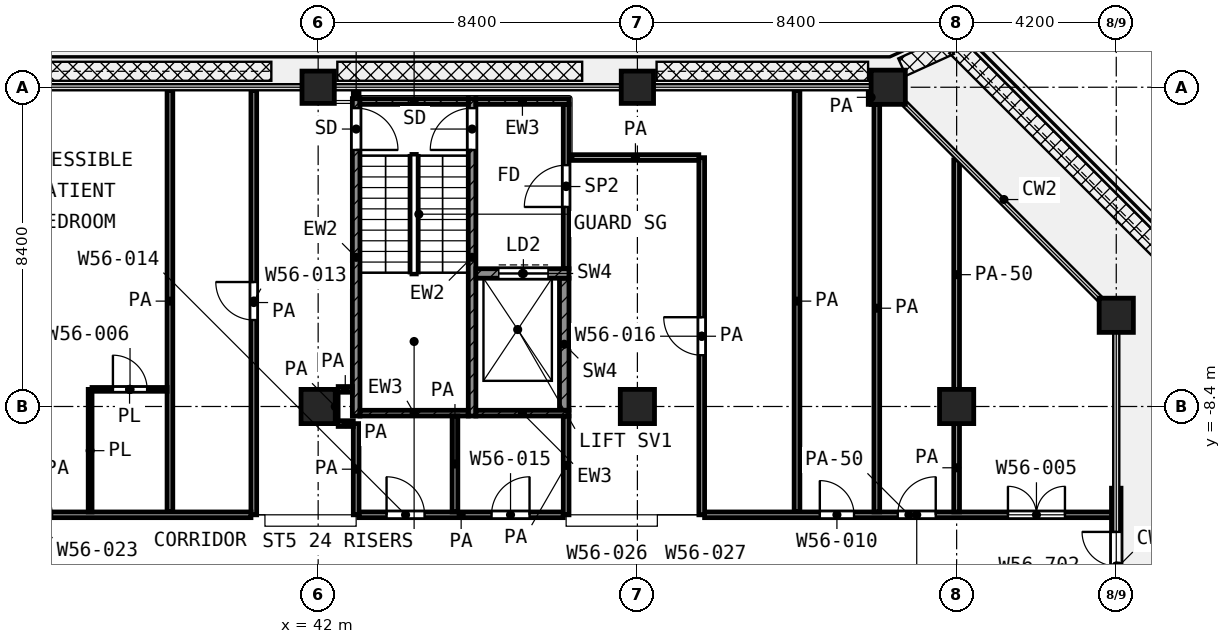
"""IFC4 building model, lengths in metres.
Left out: names, types, materials, properties, quantities, classifications, styles, units other than length and angle.
Written with IfcOpenShell. Run it as: python <this file> out.ifc"""

import sys

from ifc_helpers import new_model, si_unit, direction, frame, frame_2d, origin, origin_2d, place, context, subcontext, project, spatial, rectangle, extrude, element, fill, save


model = new_model("IFC4")
c1 = context("Model", 3, precision=1e-05, world=origin(), true_north=direction((0.0, 1.0)))
c2 = subcontext(c1, "Body", "Model", "MODEL_VIEW")
j1 = project(units=[si_unit("LENGTHUNIT", "METRE"), si_unit("PLANEANGLEUNIT", "RADIAN")], contexts=[c1])
p1 = place(None, origin())
s1 = spatial("IfcSite", under=j1, at=p1, CompositionType="ELEMENT")
p2 = place(p1, origin())
s2 = spatial("IfcBuilding", under=s1, at=p2, CompositionType="ELEMENT")
p3 = place(p2, frame((0.0, 0.0, 264.2)))
s3 = spatial("IfcBuildingStorey", under=s2, at=p3, CompositionType="ELEMENT", Elevation=264.2)
for number, where, z_axis, x_axis in (
    (1, (42.0, 0.0, 0.0), (0.0, 0.0, 1.0), (1.0, 0.0, 0.0)),
    (2, (50.4, 0.0, 0.0), (0.0, 0.0, 1.0), (1.0, 0.0, 0.0)),
):
    element("IfcColumn", number, at=place(p3, frame(where, z_axis=z_axis, x_axis=x_axis)), inside=s3, PredefinedType="COLUMN", context=c2, shape_type="SweptSolid", body=[
        extrude(rectangle(XDim=0.85, YDim=0.85, at=origin_2d()), origin(), (0.0, 0.0, 1.0), 4.2),
    ])
for number, where, z_axis, x_axis in (
    (3, (57.0, 0.0, 0.0), (0.0, 0.0, 1.0), (1.0, 0.0, 0.0)),
    (4, (63.0, -6.0, 0.0), (0.0, 0.0, 1.0), (1.0, 0.0, 0.0)),
    (5, (42.0, -8.4, 0.0), (0.0, 0.0, 1.0), (1.0, 0.0, 0.0)),
    (6, (50.4, -8.4, 0.0), (0.0, 0.0, 1.0), (1.0, 0.0, 0.0)),
    (7, (58.8, -8.4, 0.0), (0.0, 0.0, 1.0), (1.0, 0.0, 0.0)),
):
    element("IfcColumn", number, at=place(p3, frame(where, z_axis=z_axis, x_axis=x_axis)), inside=s3, PredefinedType="COLUMN", context=c2, shape_type="SweptSolid", body=[
        extrude(rectangle(XDim=0.9, YDim=0.9, at=origin_2d()), origin(), (0.0, 0.0, 1.0), 4.2),
    ])
p4 = place(p3, frame((63.0, -14.65, 0.0), z_axis=(0.0, 0.0, 1.0), x_axis=(0.0, 1.0, 0.0)))
e8 = element("IfcWall", 8, at=p4, inside=s3, PredefinedType="SOLIDWALL", context=c2, shape_type="SweptSolid", body=[
    extrude(rectangle(XDim=4.1, YDim=0.25, at=frame_2d((2.05, 0.0))), origin(), (0.0, 0.0, 1.0), 2.58),
])
p5 = place(p4, frame((1.15, 0.0, 0.0)))
e9 = element("IfcOpeningElement", 9, at=p5, cuts=e8, PredefinedType="OPENING", context=c2, shape_type="SweptSolid", body=[
    extrude(rectangle(XDim=1.8, YDim=2.1, at=frame_2d((0.9, 1.05))), frame((0.0, 0.135, 0.0), z_axis=(0.0, -1.0, 0.0), x_axis=(1.0, 0.0, 0.0)), (0.0, 0.0, 1.0), 0.27),
])
p6 = place(p3, frame((43.0, -8.65, 0.0), z_axis=(0.0, 0.0, 1.0), x_axis=(0.0, 1.0, 0.0)))
e10 = element("IfcWall", 10, at=p6, inside=s3, PredefinedType="SHEAR", context=c2, shape_type="SweptSolid", body=[
    extrude(rectangle(XDim=8.35, YDim=0.2, at=frame_2d((4.175, 0.0))), origin(), (0.0, 0.0, 1.0), 3.6),
])
p7 = place(p6, frame((7.0, 0.0, 0.0)))
e11 = element("IfcOpeningElement", 11, at=p7, cuts=e10, PredefinedType="OPENING", context=c2, shape_type="SweptSolid", body=[
    extrude(rectangle(XDim=1.1, YDim=2.1, at=frame_2d((0.55, 1.05))), frame((0.0, 0.11, 0.0), z_axis=(0.0, -1.0, 0.0), x_axis=(1.0, 0.0, 0.0)), (0.0, 0.0, 1.0), 0.22),
])
p8 = place(p3, frame((46.05, -8.65, 0.0), z_axis=(0.0, 0.0, 1.0), x_axis=(0.0, 1.0, 0.0)))
e12 = element("IfcWall", 12, at=p8, inside=s3, PredefinedType="SHEAR", context=c2, shape_type="SweptSolid", body=[
    extrude(rectangle(XDim=8.35, YDim=0.2, at=frame_2d((4.175, 0.0))), origin(), (0.0, 0.0, 1.0), 3.6),
])
p9 = place(p8, frame((7.0, 0.0, 0.0)))
e13 = element("IfcOpeningElement", 13, at=p9, cuts=e12, PredefinedType="OPENING", context=c2, shape_type="SweptSolid", body=[
    extrude(rectangle(XDim=1.1, YDim=2.1, at=frame_2d((0.55, 1.05))), frame((0.0, 0.11, 0.0), z_axis=(0.0, -1.0, 0.0), x_axis=(1.0, 0.0, 0.0)), (0.0, 0.0, 1.0), 0.22),
])
p10 = place(p3, frame((43.1, -0.375, 0.0), z_axis=(0.0, 0.0, 1.0), x_axis=(1.0, 0.0, 0.0)))
e14 = element("IfcWall", 14, at=p10, inside=s3, PredefinedType="SHEAR", context=c2, shape_type="SweptSolid", body=[
    extrude(rectangle(XDim=2.85, YDim=0.15, at=frame_2d((1.425, 0.0))), origin(), (0.0, 0.0, 1.0), 3.6),
])
p11 = place(p3, frame((46.15, -0.375, 0.0), z_axis=(0.0, 0.0, 1.0), x_axis=(1.0, 0.0, 0.0)))
e15 = element("IfcWall", 15, at=p11, inside=s3, PredefinedType="SHEAR", context=c2, shape_type="SweptSolid", body=[
    extrude(rectangle(XDim=2.45, YDim=0.15, at=frame_2d((1.225, 0.0))), origin(), (0.0, 0.0, 1.0), 3.6),
])
p12 = place(p3, frame((43.1, -8.575, 0.0), z_axis=(0.0, 0.0, 1.0), x_axis=(1.0, 0.0, 0.0)))
e16 = element("IfcWall", 16, at=p12, inside=s3, PredefinedType="SHEAR", context=c2, shape_type="SweptSolid", body=[
    extrude(rectangle(XDim=2.85, YDim=0.15, at=frame_2d((1.425, 0.0))), origin(), (0.0, 0.0, 1.0), 3.6),
])
p13 = place(p3, frame((46.15, -8.575, 0.0), z_axis=(0.0, 0.0, 1.0), x_axis=(1.0, 0.0, 0.0)))
e17 = element("IfcWall", 17, at=p13, inside=s3, PredefinedType="SHEAR", context=c2, shape_type="SweptSolid", body=[
    extrude(rectangle(XDim=2.45, YDim=0.15, at=frame_2d((1.225, 0.0))), origin(), (0.0, 0.0, 1.0), 3.6),
])
p14 = place(p3, frame((46.15, -4.9, 0.0), z_axis=(0.0, 0.0, 1.0), x_axis=(1.0, 0.0, 0.0)))
e18 = element("IfcWall", 18, at=p14, inside=s3, PredefinedType="SHEAR", context=c2, shape_type="SweptSolid", body=[
    extrude(rectangle(XDim=2.45, YDim=0.25, at=frame_2d((1.225, 0.0))), origin(), (0.0, 0.0, 1.0), 3.6),
])
p15 = place(p14, frame((0.6, 0.0, 0.0)))
e19 = element("IfcOpeningElement", 19, at=p15, cuts=e18, PredefinedType="OPENING", context=c2, shape_type="SweptSolid", body=[
    extrude(rectangle(XDim=1.3, YDim=2.1, at=frame_2d((0.65, 1.05))), frame((0.0, 0.135, 0.0), z_axis=(0.0, -1.0, 0.0), x_axis=(1.0, 0.0, 0.0)), (0.0, 0.0, 1.0), 0.27),
])
p16 = place(p3, frame((48.475, -8.5, 0.0), z_axis=(0.0, 0.0, 1.0), x_axis=(0.0, 1.0, 0.0)))
e20 = element("IfcWall", 20, at=p16, inside=s3, PredefinedType="SHEAR", context=c2, shape_type="SweptSolid", body=[
    extrude(rectangle(XDim=3.475, YDim=0.25, at=frame_2d((1.738, 0.0))), origin(), (0.0, 0.0, 1.0), 3.6),
])
p17 = place(p3, frame((48.525, -4.775, 0.0), z_axis=(0.0, 0.0, 1.0), x_axis=(0.0, 1.0, 0.0)))
e21 = element("IfcWall", 21, at=p17, inside=s3, PredefinedType="PARTITIONING", context=c2, shape_type="SweptSolid", body=[
    extrude(rectangle(XDim=4.325, YDim=0.15, at=frame_2d((2.163, 0.0))), origin(), (0.0, 0.0, 1.0), 3.6),
])
p18 = place(p17, frame((1.625, 0.0, 0.0)))
e22 = element("IfcOpeningElement", 22, at=p18, cuts=e21, PredefinedType="OPENING", context=c2, shape_type="SweptSolid", body=[
    extrude(rectangle(XDim=1.1, YDim=2.1, at=frame_2d((0.55, 1.05))), frame((0.0, 0.085, 0.0), z_axis=(0.0, -1.0, 0.0), x_axis=(1.0, 0.0, 0.0)), (0.0, 0.0, 1.0), 0.17),
])
p19 = place(p3, frame((36.05, -7.95, 0.0), z_axis=(0.0, 0.0, 1.0), x_axis=(1.0, 0.0, 0.0)))
e23 = element("IfcWall", 23, at=p19, inside=s3, PredefinedType="PARTITIONING", context=c2, shape_type="SweptSolid", body=[
    extrude(rectangle(XDim=1.975, YDim=0.1, at=frame_2d((0.987, 0.0))), origin(), (0.0, 0.0, 1.0), 3.6),
])
p20 = place(p19, frame((0.55, 0.0, 0.0)))
e24 = element("IfcOpeningElement", 24, at=p20, cuts=e23, PredefinedType="OPENING", context=c2, shape_type="SweptSolid", body=[
    extrude(rectangle(XDim=0.9, YDim=2.1, at=frame_2d((0.45, 1.05))), frame((0.0, 0.06, 0.0), z_axis=(0.0, -1.0, 0.0), x_axis=(1.0, 0.0, 0.0)), (0.0, 0.0, 1.0), 0.12),
])
p21 = place(p3, frame((36.0, -11.175, 0.0), z_axis=(0.0, 0.0, 1.0), x_axis=(0.0, 1.0, 0.0)))
e25 = element("IfcWall", 25, at=p21, inside=s3, PredefinedType="PARTITIONING", context=c2, shape_type="SweptSolid", body=[
    extrude(rectangle(XDim=3.225, YDim=0.1, at=frame_2d((1.613, 0.0))), origin(), (0.0, 0.0, 1.0), 3.6),
])
p22 = place(p3, frame((29.4, -11.25, 0.0), z_axis=(0.0, 0.0, 1.0), x_axis=(1.0, 0.0, 0.0)))
e26 = element("IfcWall", 26, at=p22, inside=s3, PredefinedType="PARTITIONING", context=c2, shape_type="SweptSolid", body=[
    extrude(rectangle(XDim=10.832, YDim=0.15, at=frame_2d((5.416, 0.0))), origin(), (0.0, 0.0, 1.0), 3.6),
])
p23 = place(p22, frame((1.5, 0.0, 0.0)))
e27 = element("IfcOpeningElement", 27, at=p23, cuts=e26, PredefinedType="OPENING", context=c2, shape_type="SweptSolid", body=[
    extrude(rectangle(XDim=1.2, YDim=2.1, at=frame_2d((0.6, 1.05))), frame((0.0, 0.085, 0.0), z_axis=(0.0, -1.0, 0.0), x_axis=(1.0, 0.0, 0.0)), (0.0, 0.0, 1.0), 0.17),
])
p24 = place(p22, frame((4.4, 0.0, 0.0)))
e28 = element("IfcOpeningElement", 28, at=p24, cuts=e26, PredefinedType="OPENING", context=c2, shape_type="SweptSolid", body=[
    extrude(rectangle(XDim=1.2, YDim=2.1, at=frame_2d((0.6, 1.05))), frame((0.0, 0.085, 0.0), z_axis=(0.0, -1.0, 0.0), x_axis=(1.0, 0.0, 0.0)), (0.0, 0.0, 1.0), 0.17),
])
p25 = place(p3, frame((43.075, -11.25, 0.0), z_axis=(0.0, 0.0, 1.0), x_axis=(1.0, 0.0, 0.0)))
e29 = element("IfcWall", 29, at=p25, inside=s3, PredefinedType="PARTITIONING", context=c2, shape_type="SweptSolid", body=[
    extrude(rectangle(XDim=5.375, YDim=0.15, at=frame_2d((2.688, 0.0))), origin(), (0.0, 0.0, 1.0), 3.6),
])
p26 = place(p25, frame((0.725, 0.0, 0.0)))
e30 = element("IfcOpeningElement", 30, at=p26, cuts=e29, PredefinedType="OPENING", context=c2, shape_type="SweptSolid", body=[
    extrude(rectangle(XDim=1.0, YDim=2.1, at=frame_2d((0.5, 1.05))), frame((0.0, 0.085, 0.0), z_axis=(0.0, -1.0, 0.0), x_axis=(1.0, 0.0, 0.0)), (0.0, 0.0, 1.0), 0.17),
])
p27 = place(p25, frame((3.487, 0.0, 0.0)))
e31 = element("IfcOpeningElement", 31, at=p27, cuts=e29, PredefinedType="OPENING", context=c2, shape_type="SweptSolid", body=[
    extrude(rectangle(XDim=1.0, YDim=2.1, at=frame_2d((0.5, 1.05))), frame((0.0, 0.085, 0.0), z_axis=(0.0, -1.0, 0.0), x_axis=(1.0, 0.0, 0.0)), (0.0, 0.0, 1.0), 0.17),
])
p28 = place(p3, frame((52.168, -11.25, 0.0), z_axis=(0.0, 0.0, 1.0), x_axis=(1.0, 0.0, 0.0)))
e32 = element("IfcWall", 32, at=p28, inside=s3, PredefinedType="PARTITIONING", context=c2, shape_type="SweptSolid", body=[
    extrude(rectangle(XDim=10.752, YDim=0.15, at=frame_2d((5.376, 0.0))), origin(), (0.0, 0.0, 1.0), 2.7),
])
p29 = place(p28, frame((3.032, 0.0, 0.0)))
e33 = element("IfcOpeningElement", 33, at=p29, cuts=e32, PredefinedType="OPENING", context=c2, shape_type="SweptSolid", body=[
    extrude(rectangle(XDim=0.9, YDim=2.1, at=frame_2d((0.45, 1.05))), frame((0.0, 0.085, 0.0), z_axis=(0.0, -1.0, 0.0), x_axis=(1.0, 0.0, 0.0)), (0.0, 0.0, 1.0), 0.17),
])
p30 = place(p28, frame((5.082, 0.0, 0.0)))
e34 = element("IfcOpeningElement", 34, at=p30, cuts=e32, PredefinedType="OPENING", context=c2, shape_type="SweptSolid", body=[
    extrude(rectangle(XDim=1.0, YDim=2.1, at=frame_2d((0.5, 1.05))), frame((0.0, 0.085, 0.0), z_axis=(0.0, -1.0, 0.0), x_axis=(1.0, 0.0, 0.0)), (0.0, 0.0, 1.0), 0.17),
])
p31 = place(p28, frame((7.982, 0.0, 0.0)))
e35 = element("IfcOpeningElement", 35, at=p31, cuts=e32, PredefinedType="OPENING", context=c2, shape_type="SweptSolid", body=[
    extrude(rectangle(XDim=1.5, YDim=2.1, at=frame_2d((0.75, 1.05))), frame((0.0, 0.085, 0.0), z_axis=(0.0, -1.0, 0.0), x_axis=(1.0, 0.0, 0.0)), (0.0, 0.0, 1.0), 0.17),
])
p32 = place(p3, frame((42.527, -8.85, 0.0), z_axis=(0.0, 0.0, 1.0), x_axis=(1.0, 0.0, 0.0)))
e36 = element("IfcWall", 36, at=p32, inside=s3, PredefinedType="PARTITIONING", context=c2, shape_type="SweptSolid", body=[
    extrude(rectangle(XDim=0.398, YDim=0.15, at=frame_2d((0.199, 0.0))), origin(), (0.0, 0.0, 1.0), 3.6),
])
p33 = place(p3, frame((42.527, -7.95, 0.0), z_axis=(0.0, 0.0, 1.0), x_axis=(1.0, 0.0, 0.0)))
e37 = element("IfcWall", 37, at=p33, inside=s3, PredefinedType="PARTITIONING", context=c2, shape_type="SweptSolid", body=[
    extrude(rectangle(XDim=0.373, YDim=0.15, at=frame_2d((0.187, 0.0))), origin(), (0.0, 0.0, 1.0), 3.6),
])
p34 = place(p3, frame((48.68, -1.85, 0.0), z_axis=(0.0, 0.0, 1.0), x_axis=(1.0, 0.0, 0.0)))
e38 = element("IfcWall", 38, at=p34, inside=s3, PredefinedType="PARTITIONING", context=c2, shape_type="SweptSolid", body=[
    extrude(rectangle(XDim=3.336, YDim=0.15, at=frame_2d((1.668, 0.0))), origin(), (0.0, 0.0, 1.0), 3.6),
])
p35 = place(p3, frame((38.1, -11.175, 0.0), z_axis=(0.0, 0.0, 1.0), x_axis=(0.0, 1.0, 0.0)))
e39 = element("IfcWall", 39, at=p35, inside=s3, PredefinedType="PARTITIONING", context=c2, shape_type="SweptSolid", body=[
    extrude(rectangle(XDim=11.095, YDim=0.15, at=frame_2d((5.547, 0.0))), origin(), (0.0, 0.0, 1.0), 3.6),
])
p36 = place(p3, frame((40.307, -11.25, 0.0), z_axis=(0.0, 0.0, 1.0), x_axis=(0.0, 1.0, 0.0)))
e40 = element("IfcWall", 40, at=p36, inside=s3, PredefinedType="PARTITIONING", context=c2, shape_type="SweptSolid", body=[
    extrude(rectangle(XDim=11.17, YDim=0.15, at=frame_2d((5.585, 0.0))), origin(), (0.0, 0.0, 1.0), 3.6),
])
p37 = place(p36, frame((5.125, 0.0, 0.0)))
e41 = element("IfcOpeningElement", 41, at=p37, cuts=e40, PredefinedType="OPENING", context=c2, shape_type="SweptSolid", body=[
    extrude(rectangle(XDim=1.0, YDim=2.1, at=frame_2d((0.5, 1.05))), frame((0.0, 0.085, 0.0), z_axis=(0.0, -1.0, 0.0), x_axis=(1.0, 0.0, 0.0)), (0.0, 0.0, 1.0), 0.17),
])
p38 = place(p3, frame((42.45, -8.849, 0.0), z_axis=(0.0, 0.0, 1.0), x_axis=(0.0, 1.0, 0.0)))
e42 = element("IfcWall", 42, at=p38, inside=s3, PredefinedType="PARTITIONING", context=c2, shape_type="SweptSolid", body=[
    extrude(rectangle(XDim=0.897, YDim=0.15, at=frame_2d((0.449, 0.0))), origin(), (0.0, 0.0, 1.0), 3.6),
])
p39 = place(p3, frame((43.0, -11.25, 0.0), z_axis=(0.0, 0.0, 1.0), x_axis=(0.0, 1.0, 0.0)))
e43 = element("IfcWall", 43, at=p39, inside=s3, PredefinedType="PARTITIONING", context=c2, shape_type="SweptSolid", body=[
    extrude(rectangle(XDim=2.4, YDim=0.15, at=frame_2d((1.2, 0.0))), origin(), (0.0, 0.0, 1.0), 3.6),
])
p40 = place(p3, frame((43.0, -0.27, 0.0), z_axis=(0.0, 0.0, 1.0), x_axis=(0.0, 1.0, 0.0)))
e44 = element("IfcWall", 44, at=p40, inside=s3, PredefinedType="PARTITIONING", context=c2, shape_type="SweptSolid", body=[
    extrude(rectangle(XDim=0.19, YDim=0.15, at=frame_2d((0.095, 0.0))), origin(), (0.0, 0.0, 1.0), 3.6),
])
p41 = place(p3, frame((45.6, -11.175, 0.0), z_axis=(0.0, 0.0, 1.0), x_axis=(0.0, 1.0, 0.0)))
e45 = element("IfcWall", 45, at=p41, inside=s3, PredefinedType="PARTITIONING", context=c2, shape_type="SweptSolid", body=[
    extrude(rectangle(XDim=2.525, YDim=0.15, at=frame_2d((1.263, 0.0))), origin(), (0.0, 0.0, 1.0), 3.6),
])
p42 = place(p3, frame((48.525, -11.25, 0.0), z_axis=(0.0, 0.0, 1.0), x_axis=(0.0, 1.0, 0.0)))
e46 = element("IfcWall", 46, at=p42, inside=s3, PredefinedType="PARTITIONING", context=c2, shape_type="SweptSolid", body=[
    extrude(rectangle(XDim=2.6, YDim=0.15, at=frame_2d((1.3, 0.0))), origin(), (0.0, 0.0, 1.0), 3.6),
])
p43 = place(p3, frame((52.093, -11.25, 0.0), z_axis=(0.0, 0.0, 1.0), x_axis=(0.0, 1.0, 0.0)))
e47 = element("IfcWall", 47, at=p43, inside=s3, PredefinedType="PARTITIONING", context=c2, shape_type="SweptSolid", body=[
    extrude(rectangle(XDim=9.397, YDim=0.15, at=frame_2d((4.698, 0.0))), origin(), (0.0, 0.0, 1.0), 3.6),
])
p44 = place(p43, frame((4.199, 0.0, 0.0)))
e48 = element("IfcOpeningElement", 48, at=p44, cuts=e47, PredefinedType="OPENING", context=c2, shape_type="SweptSolid", body=[
    extrude(rectangle(XDim=1.0, YDim=2.1, at=frame_2d((0.5, 1.05))), frame((0.0, 0.085, 0.0), z_axis=(0.0, -1.0, 0.0), x_axis=(1.0, 0.0, 0.0)), (0.0, 0.0, 1.0), 0.17),
])
p45 = place(p3, frame((54.6, -11.175, 0.0), z_axis=(0.0, 0.0, 1.0), x_axis=(0.0, 1.0, 0.0)))
e49 = element("IfcWall", 49, at=p45, inside=s3, PredefinedType="PARTITIONING", context=c2, shape_type="SweptSolid", body=[
    extrude(rectangle(XDim=11.095, YDim=0.15, at=frame_2d((5.547, 0.0))), origin(), (0.0, 0.0, 1.0), 3.6),
])
p46 = place(p3, frame((56.55, -0.45, 0.0), z_axis=(0.0, 0.0, 1.0), x_axis=(0.0, 1.0, 0.0)))
e50 = element("IfcWall", 50, at=p46, inside=s3, PredefinedType="PARTITIONING", context=c2, shape_type="SweptSolid", body=[
    extrude(rectangle(XDim=0.37, YDim=0.15, at=frame_2d((0.185, 0.0))), origin(), (0.0, 0.0, 1.0), 3.6),
])
p47 = place(p3, frame((56.7, -11.175, 0.0), z_axis=(0.0, 0.0, 1.0), x_axis=(0.0, 1.0, 0.0)))
e51 = element("IfcWall", 51, at=p47, inside=s3, PredefinedType="PARTITIONING", context=c2, shape_type="SweptSolid", body=[
    extrude(rectangle(XDim=10.722, YDim=0.15, at=frame_2d((5.361, 0.0))), origin(), (0.0, 0.0, 1.0), 3.6),
])
p48 = place(p3, frame((58.8, -11.175, 0.0), z_axis=(0.0, 0.0, 1.0), x_axis=(0.0, 1.0, 0.0)))
e52 = element("IfcWall", 52, at=p48, inside=s3, PredefinedType="PARTITIONING", context=c2, shape_type="SweptSolid", body=[
    extrude(rectangle(XDim=2.325, YDim=0.15, at=frame_2d((1.163, 0.0))), origin(), (0.0, 0.0, 1.0), 3.6),
])
p49 = place(p3, frame((58.8, -7.95, 0.0), z_axis=(0.0, 0.0, 1.0), x_axis=(0.0, 1.0, 0.0)))
e53 = element("IfcWall", 53, at=p49, inside=s3, PredefinedType="PARTITIONING", context=c2, shape_type="SweptSolid", body=[
    extrude(rectangle(XDim=6.037, YDim=0.15, at=frame_2d((3.019, 0.0))), origin(), (0.0, 0.0, 1.0), 2.7),
])
p50 = place(p5, origin())
e54 = element("IfcDoor", 54, at=p50, inside=s3, OperationType="DOUBLE_DOOR_SINGLE_SWING", PredefinedType="DOOR", context=c2, shape_type="SweptSolid", body=[
    extrude(rectangle(XDim=1.8, YDim=2.1, at=frame_2d((0.9, 1.05))), frame((0.0, 0.025, 0.0), z_axis=(0.0, -1.0, 0.0), x_axis=(1.0, 0.0, 0.0)), (0.0, 0.0, 1.0), 0.05),
])
fill(e9, e54)
p51 = place(p7, frame((1.1, 0.0, 0.0), z_axis=(0.0, 0.0, 1.0), x_axis=(-1.0, 0.0, 0.0)))
e55 = element("IfcDoor", 55, at=p51, inside=s3, OperationType="SINGLE_SWING_LEFT", PredefinedType="DOOR", context=c2, shape_type="SweptSolid", body=[
    extrude(rectangle(XDim=1.1, YDim=2.1, at=frame_2d((0.55, 1.05))), frame((0.0, 0.025, 0.0), z_axis=(0.0, -1.0, 0.0), x_axis=(1.0, 0.0, 0.0)), (0.0, 0.0, 1.0), 0.05),
])
fill(e11, e55)
p52 = place(p9, origin())
e56 = element("IfcDoor", 56, at=p52, inside=s3, OperationType="SINGLE_SWING_LEFT", PredefinedType="DOOR", context=c2, shape_type="SweptSolid", body=[
    extrude(rectangle(XDim=1.1, YDim=2.1, at=frame_2d((0.55, 1.05))), frame((0.0, 0.025, 0.0), z_axis=(0.0, -1.0, 0.0), x_axis=(1.0, 0.0, 0.0)), (0.0, 0.0, 1.0), 0.05),
])
fill(e13, e56)
p53 = place(p15, origin())
e57 = element("IfcDoor", 57, at=p53, inside=s3, OperationType="DOUBLE_DOOR_SLIDING", PredefinedType="DOOR", context=c2, shape_type="SweptSolid", body=[
    extrude(rectangle(XDim=1.3, YDim=2.1, at=frame_2d((0.65, 1.05))), frame((0.0, 0.025, 0.0), z_axis=(0.0, -1.0, 0.0), x_axis=(1.0, 0.0, 0.0)), (0.0, 0.0, 1.0), 0.05),
])
fill(e19, e57)
p54 = place(p18, origin())
e58 = element("IfcDoor", 58, at=p54, inside=s3, OperationType="SINGLE_SWING_LEFT", PredefinedType="DOOR", context=c2, shape_type="SweptSolid", body=[
    extrude(rectangle(XDim=1.1, YDim=2.1, at=frame_2d((0.55, 1.05))), frame((0.0, 0.025, 0.0), z_axis=(0.0, -1.0, 0.0), x_axis=(1.0, 0.0, 0.0)), (0.0, 0.0, 1.0), 0.05),
])
fill(e22, e58)
p55 = place(p20, origin())
e59 = element("IfcDoor", 59, at=p55, inside=s3, OperationType="SINGLE_SWING_LEFT", PredefinedType="DOOR", context=c2, shape_type="SweptSolid", body=[
    extrude(rectangle(XDim=0.9, YDim=2.1, at=frame_2d((0.45, 1.05))), frame((0.0, 0.025, 0.0), z_axis=(0.0, -1.0, 0.0), x_axis=(1.0, 0.0, 0.0)), (0.0, 0.0, 1.0), 0.05),
])
fill(e24, e59)
p56 = place(p37, origin())
e60 = element("IfcDoor", 60, at=p56, inside=s3, OperationType="SINGLE_SWING_RIGHT", PredefinedType="DOOR", context=c2, shape_type="SweptSolid", body=[
    extrude(rectangle(XDim=1.0, YDim=2.1, at=frame_2d((0.5, 1.05))), frame((0.0, 0.025, 0.0), z_axis=(0.0, -1.0, 0.0), x_axis=(1.0, 0.0, 0.0)), (0.0, 0.0, 1.0), 0.05),
])
fill(e41, e60)
p57 = place(p26, origin())
e61 = element("IfcDoor", 61, at=p57, inside=s3, OperationType="SINGLE_SWING_LEFT", PredefinedType="DOOR", context=c2, shape_type="SweptSolid", body=[
    extrude(rectangle(XDim=1.0, YDim=2.1, at=frame_2d((0.5, 1.05))), frame((0.0, 0.025, 0.0), z_axis=(0.0, -1.0, 0.0), x_axis=(1.0, 0.0, 0.0)), (0.0, 0.0, 1.0), 0.05),
])
fill(e30, e61)
p58 = place(p27, origin())
e62 = element("IfcDoor", 62, at=p58, inside=s3, OperationType="SINGLE_SWING_RIGHT", PredefinedType="DOOR", context=c2, shape_type="SweptSolid", body=[
    extrude(rectangle(XDim=1.0, YDim=2.1, at=frame_2d((0.5, 1.05))), frame((0.0, 0.025, 0.0), z_axis=(0.0, -1.0, 0.0), x_axis=(1.0, 0.0, 0.0)), (0.0, 0.0, 1.0), 0.05),
])
fill(e31, e62)
p59 = place(p44, origin())
e63 = element("IfcDoor", 63, at=p59, inside=s3, OperationType="SINGLE_SWING_RIGHT", PredefinedType="DOOR", context=c2, shape_type="SweptSolid", body=[
    extrude(rectangle(XDim=1.0, YDim=2.1, at=frame_2d((0.5, 1.05))), frame((0.0, 0.025, 0.0), z_axis=(0.0, -1.0, 0.0), x_axis=(1.0, 0.0, 0.0)), (0.0, 0.0, 1.0), 0.05),
])
fill(e48, e63)
p60 = place(p29, origin())
e64 = element("IfcDoor", 64, at=p60, inside=s3, OperationType="SINGLE_SWING_LEFT", PredefinedType="DOOR", context=c2, shape_type="SweptSolid", body=[
    extrude(rectangle(XDim=0.9, YDim=2.1, at=frame_2d((0.45, 1.05))), frame((0.0, 0.025, 0.0), z_axis=(0.0, -1.0, 0.0), x_axis=(1.0, 0.0, 0.0)), (0.0, 0.0, 1.0), 0.05),
])
fill(e33, e64)
p61 = place(p30, origin())
e65 = element("IfcDoor", 65, at=p61, inside=s3, OperationType="SINGLE_SWING_RIGHT", PredefinedType="DOOR", context=c2, shape_type="SweptSolid", body=[
    extrude(rectangle(XDim=1.0, YDim=2.1, at=frame_2d((0.5, 1.05))), frame((0.0, 0.025, 0.0), z_axis=(0.0, -1.0, 0.0), x_axis=(1.0, 0.0, 0.0)), (0.0, 0.0, 1.0), 0.05),
])
fill(e34, e65)
p62 = place(p31, origin())
e66 = element("IfcDoor", 66, at=p62, inside=s3, OperationType="DOUBLE_DOOR_SINGLE_SWING", PredefinedType="DOOR", context=c2, shape_type="SweptSolid", body=[
    extrude(rectangle(XDim=1.5, YDim=2.1, at=frame_2d((0.75, 1.05))), frame((0.0, 0.025, 0.0), z_axis=(0.0, -1.0, 0.0), x_axis=(1.0, 0.0, 0.0)), (0.0, 0.0, 1.0), 0.05),
])
fill(e35, e66)
save(model, sys.argv[1])
